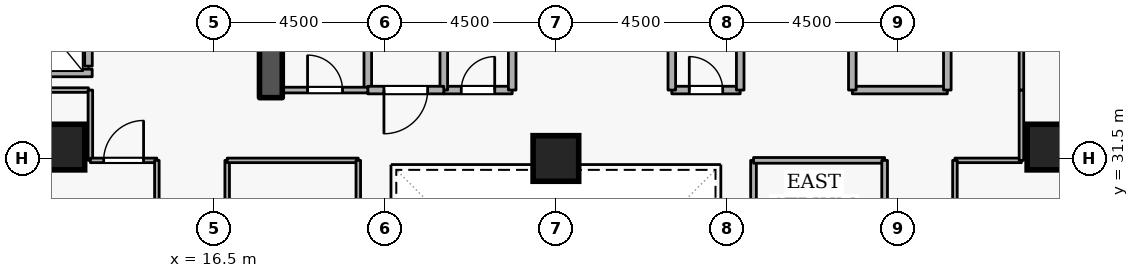
"""IFC4 building model, lengths in metres.
Left out: names, types, materials, properties, quantities, classifications, styles, units other than length and angle.
Written with IfcOpenShell. Run it as: python <this file> out.ifc"""

import sys

from ifc_helpers import new_model, si_unit, direction, frame, frame_2d, origin, origin_2d, place, context, subcontext, project, spatial, rectangle, extrude, element, fill, save


model = new_model("IFC4")
c1 = context("Model", 3, precision=1e-05, world=origin(), true_north=direction((0.0, 1.0)))
c2 = subcontext(c1, "Body", "Model", "MODEL_VIEW")
j1 = project(units=[si_unit("LENGTHUNIT", "METRE"), si_unit("PLANEANGLEUNIT", "RADIAN")], contexts=[c1])
p1 = place(None, origin())
s1 = spatial("IfcSite", under=j1, at=p1, CompositionType="ELEMENT")
p2 = place(p1, origin())
s2 = spatial("IfcBuilding", under=s1, at=p2, CompositionType="ELEMENT")
p3 = place(p2, frame((0.0, 0.0, 112.5)))
s3 = spatial("IfcBuildingStorey", under=s2, at=p3, CompositionType="ELEMENT", Elevation=112.5)
p4 = place(p3, frame((18.0, 33.1, 0.0), z_axis=(0.0, 0.0, 1.0), x_axis=(0.0, 1.0, 0.0)))
e1 = element("IfcWall", 1, at=p4, inside=s3, PredefinedType="SHEAR", context=c2, shape_type="SweptSolid", body=[
    extrude(rectangle(XDim=5.7, YDim=0.6, at=frame_2d((2.85, 0.0))), origin(), (0.0, 0.0, 1.0), 3.6),
])
for number, where, z_axis, x_axis in (
    (2, (12.5, 31.8, 0.0), (0.0, 0.0, 1.0), (1.0, 0.0, 0.0)),
    (3, (38.5, 31.8, 0.0), (0.0, 0.0, 1.0), (1.0, 0.0, 0.0)),
    (4, (25.5, 31.5, 0.0), (0.0, 0.0, 1.0), (1.0, 0.0, 0.0)),
):
    element("IfcColumn", number, at=place(p3, frame(where, z_axis=z_axis, x_axis=x_axis)), inside=s3, PredefinedType="COLUMN", context=c2, shape_type="SweptSolid", body=[
        extrude(rectangle(XDim=1.2, YDim=1.2, at=origin_2d()), origin(), (0.0, 0.0, 1.0), 3.6),
    ])
p5 = place(p3, frame((13.2, 33.93, 0.0), z_axis=(0.0, 0.0, 1.0), x_axis=(0.0, 1.0, 0.0)))
e5 = element("IfcWall", 5, at=p5, inside=s3, PredefinedType="STANDARD", context=c2, shape_type="SweptSolid", body=[
    extrude(rectangle(XDim=1.94, YDim=0.2, at=frame_2d((0.97, 0.0))), origin(), (0.0, 0.0, 1.0), 3.34),
])
p6 = place(p5, frame((0.46, 0.0, 0.0)))
e6 = element("IfcOpeningElement", 6, at=p6, cuts=e5, PredefinedType="OPENING", context=c2, shape_type="SweptSolid", body=[
    extrude(rectangle(XDim=1.02, YDim=2.06, at=frame_2d((0.51, 1.03))), frame((0.0, 0.11, 0.0), z_axis=(0.0, -1.0, 0.0), x_axis=(1.0, 0.0, 0.0)), (0.0, 0.0, 1.0), 0.22),
])
p7 = place(p3, frame((11.002, 33.75, 0.0), z_axis=(0.0, 0.0, 1.0), x_axis=(1.0, 0.0, 0.0)))
e7 = element("IfcWall", 7, at=p7, inside=s3, PredefinedType="STANDARD", context=c2, shape_type="SweptSolid", body=[
    extrude(rectangle(XDim=2.296, YDim=0.2, at=frame_2d((1.148, 0.0))), origin(), (0.0, 0.0, 1.0), 3.34),
])
p8 = place(p3, frame((33.3, 33.3, 0.0), z_axis=(0.0, 0.0, 1.0), x_axis=(1.0, 0.0, 0.0)))
e8 = element("IfcWall", 8, at=p8, inside=s3, PredefinedType="STANDARD", context=c2, shape_type="SweptSolid", body=[
    extrude(rectangle(XDim=2.5, YDim=0.2, at=frame_2d((1.25, 0.0))), origin(), (0.0, 0.0, 1.0), 3.34),
])
p9 = place(p3, frame((35.8, 33.3, 0.0), z_axis=(0.0, 0.0, 1.0), x_axis=(0.0, 1.0, 0.0)))
e9 = element("IfcWall", 9, at=p9, inside=s3, PredefinedType="STANDARD", context=c2, shape_type="SweptSolid", body=[
    extrude(rectangle(XDim=5.7, YDim=0.2, at=frame_2d((2.85, 0.0))), origin(), (0.0, 0.0, 1.0), 3.34),
])
p10 = place(p9, frame((2.275, 0.0, 0.0)))
e10 = element("IfcOpeningElement", 10, at=p10, cuts=e9, PredefinedType="OPENING", context=c2, shape_type="SweptSolid", body=[
    extrude(rectangle(XDim=1.15, YDim=2.1, at=frame_2d((0.575, 1.05))), frame((0.0, 0.11, 0.0), z_axis=(0.0, -1.0, 0.0), x_axis=(1.0, 0.0, 0.0)), (0.0, 0.0, 1.0), 0.22),
])
p11 = place(p3, frame((33.3, 35.6, 0.0), z_axis=(0.0, 0.0, 1.0), x_axis=(0.0, -1.0, 0.0)))
e11 = element("IfcWall", 11, at=p11, inside=s3, PredefinedType="STANDARD", context=c2, shape_type="SweptSolid", body=[
    extrude(rectangle(XDim=2.3, YDim=0.2, at=frame_2d((1.15, 0.0))), origin(), (0.0, 0.0, 1.0), 2.545),
])
p12 = place(p3, frame((22.55, 33.3, 0.0), z_axis=(0.0, 0.0, 1.0), x_axis=(1.0, 0.0, 0.0)))
e12 = element("IfcWall", 12, at=p12, inside=s3, PredefinedType="STANDARD", context=c2, shape_type="SweptSolid", body=[
    extrude(rectangle(XDim=1.8, YDim=0.2, at=frame_2d((0.9, 0.0))), origin(), (0.0, 0.0, 1.0), 3.34),
])
p13 = place(p12, frame((0.46, 0.0, 0.0)))
e13 = element("IfcOpeningElement", 13, at=p13, cuts=e12, PredefinedType="OPENING", context=c2, shape_type="SweptSolid", body=[
    extrude(rectangle(XDim=0.88, YDim=2.04, at=frame_2d((0.44, 1.02))), frame((0.0, 0.11, 0.0), z_axis=(0.0, -1.0, 0.0), x_axis=(1.0, 0.0, 0.0)), (0.0, 0.0, 1.0), 0.22),
])
for number, where, z_axis, x_axis in (
    (14, (24.35, 33.3, 0.0), (0.0, 0.0, 1.0), (0.0, 1.0, 0.0)),
    (15, (22.55, 35.35, 0.0), (0.0, 0.0, 1.0), (0.0, -1.0, 0.0)),
):
    element("IfcWall", number, at=place(p3, frame(where, z_axis=z_axis, x_axis=x_axis)), inside=s3, PredefinedType="STANDARD", context=c2, shape_type="SweptSolid", body=[
        extrude(rectangle(XDim=2.05, YDim=0.2, at=frame_2d((1.025, 0.0))), origin(), (0.0, 0.0, 1.0), 3.34),
    ])
p14 = place(p3, frame((28.55, 33.3, 0.0), z_axis=(0.0, 0.0, 1.0), x_axis=(1.0, 0.0, 0.0)))
e16 = element("IfcWall", 16, at=p14, inside=s3, PredefinedType="STANDARD", context=c2, shape_type="SweptSolid", body=[
    extrude(rectangle(XDim=1.8, YDim=0.2, at=frame_2d((0.9, 0.0))), origin(), (0.0, 0.0, 1.0), 3.34),
])
p15 = place(p14, frame((0.46, 0.0, 0.0)))
e17 = element("IfcOpeningElement", 17, at=p15, cuts=e16, PredefinedType="OPENING", context=c2, shape_type="SweptSolid", body=[
    extrude(rectangle(XDim=0.88, YDim=2.04, at=frame_2d((0.44, 1.02))), frame((0.0, 0.11, 0.0), z_axis=(0.0, -1.0, 0.0), x_axis=(1.0, 0.0, 0.0)), (0.0, 0.0, 1.0), 0.22),
])
for number, where, z_axis, x_axis in (
    (18, (30.35, 33.3, 0.0), (0.0, 0.0, 1.0), (0.0, 1.0, 0.0)),
    (19, (28.55, 35.35, 0.0), (0.0, 0.0, 1.0), (0.0, -1.0, 0.0)),
    (20, (20.55, 33.3, 0.0), (0.0, 0.0, 1.0), (0.0, 1.0, 0.0)),
):
    element("IfcWall", number, at=place(p3, frame(where, z_axis=z_axis, x_axis=x_axis)), inside=s3, PredefinedType="STANDARD", context=c2, shape_type="SweptSolid", body=[
        extrude(rectangle(XDim=2.05, YDim=0.2, at=frame_2d((1.025, 0.0))), origin(), (0.0, 0.0, 1.0), 3.34),
    ])
p16 = place(p3, frame((22.55, 33.3, 0.0), z_axis=(0.0, 0.0, 1.0), x_axis=(-1.0, 0.0, 0.0)))
e21 = element("IfcWall", 21, at=p16, inside=s3, PredefinedType="STANDARD", context=c2, shape_type="SweptSolid", body=[
    extrude(rectangle(XDim=2.0, YDim=0.2, at=frame_2d((1.0, 0.0))), origin(), (0.0, 0.0, 1.0), 3.34),
])
p17 = place(p16, frame((0.425, 0.0, 0.0)))
e22 = element("IfcOpeningElement", 22, at=p17, cuts=e21, PredefinedType="OPENING", context=c2, shape_type="SweptSolid", body=[
    extrude(rectangle(XDim=1.15, YDim=2.1, at=frame_2d((0.575, 1.05))), frame((0.0, 0.11, 0.0), z_axis=(0.0, -1.0, 0.0), x_axis=(1.0, 0.0, 0.0)), (0.0, 0.0, 1.0), 0.22),
])
p18 = place(p3, frame((18.3, 33.3, 0.0), z_axis=(0.0, 0.0, 1.0), x_axis=(1.0, 0.0, 0.0)))
e23 = element("IfcWall", 23, at=p18, inside=s3, PredefinedType="PARTITIONING", context=c2, shape_type="SweptSolid", body=[
    extrude(rectangle(XDim=2.25, YDim=0.15, at=frame_2d((1.125, 0.0))), origin(), (0.0, 0.0, 1.0), 3.34),
])
p19 = place(p18, frame((0.665, 0.0, 0.0)))
e24 = element("IfcOpeningElement", 24, at=p19, cuts=e23, PredefinedType="OPENING", context=c2, shape_type="SweptSolid", body=[
    extrude(rectangle(XDim=0.92, YDim=2.08, at=frame_2d((0.46, 1.04))), frame((0.0, 0.085, 0.0), z_axis=(0.0, -1.0, 0.0), x_axis=(1.0, 0.0, 0.0)), (0.0, 0.0, 1.0), 0.17),
])
p20 = place(p3, frame((10.9, 33.3, 0.0), z_axis=(0.0, 0.0, 1.0), x_axis=(1.0, 0.0, 0.0)))
e25 = element("IfcWall", 25, at=p20, inside=s3, PredefinedType="PARTITIONING", context=c2, shape_type="SweptSolid", body=[
    extrude(rectangle(XDim=2.3, YDim=0.12, at=frame_2d((1.15, 0.0))), origin(), (0.0, 0.0, 1.0), 3.34),
])
p21 = place(p3, frame((13.25, 33.3, 0.0), z_axis=(0.0, 0.0, 1.0), x_axis=(0.0, -1.0, 0.0)))
e26 = element("IfcWall", 26, at=p21, inside=s3, PredefinedType="PARTITIONING", context=c2, shape_type="SweptSolid", body=[
    extrude(rectangle(XDim=1.85, YDim=0.12, at=frame_2d((0.925, 0.0))), origin(), (0.0, 0.0, 1.0), 3.34),
])
p22 = place(p3, frame((13.25, 31.45, 0.0), z_axis=(0.0, 0.0, 1.0), x_axis=(1.0, 0.0, 0.0)))
e27 = element("IfcWall", 27, at=p22, inside=s3, PredefinedType="PARTITIONING", context=c2, shape_type="SweptSolid", body=[
    extrude(rectangle(XDim=1.75, YDim=0.12, at=frame_2d((0.875, 0.0))), origin(), (0.0, 0.0, 1.0), 3.34),
])
p23 = place(p22, frame((0.35, 0.0, 0.0)))
e28 = element("IfcOpeningElement", 28, at=p23, cuts=e27, PredefinedType="OPENING", context=c2, shape_type="SweptSolid", body=[
    extrude(rectangle(XDim=1.05, YDim=2.1, at=frame_2d((0.525, 1.05))), frame((0.0, 0.07, 0.0), z_axis=(0.0, -1.0, 0.0), x_axis=(1.0, 0.0, 0.0)), (0.0, 0.0, 1.0), 0.14),
])
p24 = place(p3, frame((15.0, 31.45, 0.0), z_axis=(0.0, 0.0, 1.0), x_axis=(0.0, -1.0, 0.0)))
e29 = element("IfcWall", 29, at=p24, inside=s3, PredefinedType="PARTITIONING", context=c2, shape_type="SweptSolid", body=[
    extrude(rectangle(XDim=1.3, YDim=0.12, at=frame_2d((0.65, 0.0))), origin(), (0.0, 0.0, 1.0), 3.34),
])
p25 = place(p3, frame((36.0, 31.45, 0.0), z_axis=(0.0, 0.0, 1.0), x_axis=(1.0, 0.0, 0.0)))
e30 = element("IfcWall", 30, at=p25, inside=s3, PredefinedType="PARTITIONING", context=c2, shape_type="SweptSolid", body=[
    extrude(rectangle(XDim=1.75, YDim=0.12, at=frame_2d((0.875, 0.0))), origin(), (0.0, 0.0, 1.0), 3.34),
])
p26 = place(p3, frame((37.75, 31.45, 0.0), z_axis=(0.0, 0.0, 1.0), x_axis=(0.0, 1.0, 0.0)))
e31 = element("IfcWall", 31, at=p26, inside=s3, PredefinedType="PARTITIONING", context=c2, shape_type="SweptSolid", body=[
    extrude(rectangle(XDim=1.85, YDim=0.12, at=frame_2d((0.925, 0.0))), origin(), (0.0, 0.0, 1.0), 3.34),
])
p27 = place(p3, frame((37.75, 33.3, 0.0), z_axis=(0.0, 0.0, 1.0), x_axis=(0.0, 1.0, 0.0)))
e32 = element("IfcWall", 32, at=p27, inside=s3, PredefinedType="PARTITIONING", context=c2, shape_type="SweptSolid", body=[
    extrude(rectangle(XDim=9.35, YDim=0.12, at=frame_2d((4.675, 0.0))), origin(), (0.0, 0.0, 1.0), 3.34),
])
p28 = place(p27, frame((4.2, 0.0, 0.0)))
e33 = element("IfcOpeningElement", 33, at=p28, cuts=e32, PredefinedType="OPENING", context=c2, shape_type="SweptSolid", body=[
    extrude(rectangle(XDim=0.95, YDim=2.1, at=frame_2d((0.475, 1.05))), frame((0.0, 0.07, 0.0), z_axis=(0.0, -1.0, 0.0), x_axis=(1.0, 0.0, 0.0)), (0.0, 0.0, 1.0), 0.14),
])
p29 = place(p3, frame((36.0, 30.15, 0.0), z_axis=(0.0, 0.0, 1.0), x_axis=(0.0, 1.0, 0.0)))
e34 = element("IfcWall", 34, at=p29, inside=s3, PredefinedType="PARTITIONING", context=c2, shape_type="SweptSolid", body=[
    extrude(rectangle(XDim=1.3, YDim=0.12, at=frame_2d((0.65, 0.0))), origin(), (0.0, 0.0, 1.0), 3.34),
])
p30 = place(p3, frame((30.7, 22.55, 0.0), z_axis=(0.0, 0.0, 1.0), x_axis=(0.0, 1.0, 0.0)))
e35 = element("IfcWall", 35, at=p30, inside=s3, PredefinedType="PARTITIONING", context=c2, shape_type="SweptSolid", body=[
    extrude(rectangle(XDim=8.9, YDim=0.15, at=frame_2d((4.45, 0.0))), origin(), (0.0, 0.0, 1.0), 3.34),
])
p31 = place(p3, frame((30.7, 31.45, 0.0), z_axis=(0.0, 0.0, 1.0), x_axis=(1.0, 0.0, 0.0)))
e36 = element("IfcWall", 36, at=p31, inside=s3, PredefinedType="PARTITIONING", context=c2, shape_type="SweptSolid", body=[
    extrude(rectangle(XDim=3.45, YDim=0.15, at=frame_2d((1.725, 0.0))), origin(), (0.0, 0.0, 1.0), 3.34),
])
p32 = place(p3, frame((34.15, 31.45, 0.0), z_axis=(0.0, 0.0, 1.0), x_axis=(0.0, -1.0, 0.0)))
e37 = element("IfcWall", 37, at=p32, inside=s3, PredefinedType="PARTITIONING", context=c2, shape_type="SweptSolid", body=[
    extrude(rectangle(XDim=8.9, YDim=0.15, at=frame_2d((4.45, 0.0))), origin(), (0.0, 0.0, 1.0), 3.34),
])
p33 = place(p32, frame((3.8, 0.0, 0.0)))
e38 = element("IfcOpeningElement", 38, at=p33, cuts=e37, PredefinedType="OPENING", context=c2, shape_type="SweptSolid", body=[
    extrude(rectangle(XDim=1.3, YDim=2.12, at=frame_2d((0.65, 1.06))), frame((0.0, 0.085, 0.0), z_axis=(0.0, -1.0, 0.0), x_axis=(1.0, 0.0, 0.0)), (0.0, 0.0, 1.0), 0.17),
])
p34 = place(p3, frame((16.85, 22.55, 0.0), z_axis=(0.0, 0.0, 1.0), x_axis=(0.0, 1.0, 0.0)))
e39 = element("IfcWall", 39, at=p34, inside=s3, PredefinedType="PARTITIONING", context=c2, shape_type="SweptSolid", body=[
    extrude(rectangle(XDim=8.9, YDim=0.12, at=frame_2d((4.45, 0.0))), origin(), (0.0, 0.0, 1.0), 3.34),
])
p35 = place(p34, frame((3.975, 0.0, 0.0)))
e40 = element("IfcOpeningElement", 40, at=p35, cuts=e39, PredefinedType="OPENING", context=c2, shape_type="SweptSolid", body=[
    extrude(rectangle(XDim=0.95, YDim=2.1, at=frame_2d((0.475, 1.05))), frame((0.0, 0.07, 0.0), z_axis=(0.0, -1.0, 0.0), x_axis=(1.0, 0.0, 0.0)), (0.0, 0.0, 1.0), 0.14),
])
p36 = place(p3, frame((16.85, 31.45, 0.0), z_axis=(0.0, 0.0, 1.0), x_axis=(1.0, 0.0, 0.0)))
e41 = element("IfcWall", 41, at=p36, inside=s3, PredefinedType="PARTITIONING", context=c2, shape_type="SweptSolid", body=[
    extrude(rectangle(XDim=3.45, YDim=0.12, at=frame_2d((1.725, 0.0))), origin(), (0.0, 0.0, 1.0), 3.34),
])
p37 = place(p3, frame((20.3, 31.45, 0.0), z_axis=(0.0, 0.0, 1.0), x_axis=(0.0, -1.0, 0.0)))
e42 = element("IfcWall", 42, at=p37, inside=s3, PredefinedType="PARTITIONING", context=c2, shape_type="SweptSolid", body=[
    extrude(rectangle(XDim=8.9, YDim=0.12, at=frame_2d((4.45, 0.0))), origin(), (0.0, 0.0, 1.0), 3.34),
])
p38 = place(p13, origin())
e43 = element("IfcDoor", 43, at=p38, inside=s3, OperationType="SINGLE_SWING_RIGHT", PredefinedType="DOOR", context=c2, shape_type="SweptSolid", body=[
    extrude(rectangle(XDim=0.88, YDim=2.04, at=frame_2d((0.44, 1.02))), frame((0.0, 0.025, 0.0), z_axis=(0.0, -1.0, 0.0), x_axis=(1.0, 0.0, 0.0)), (0.0, 0.0, 1.0), 0.05),
])
fill(e13, e43)
p39 = place(p15, origin())
e44 = element("IfcDoor", 44, at=p39, inside=s3, OperationType="SINGLE_SWING_LEFT", PredefinedType="DOOR", context=c2, shape_type="SweptSolid", body=[
    extrude(rectangle(XDim=0.88, YDim=2.04, at=frame_2d((0.44, 1.02))), frame((0.0, 0.025, 0.0), z_axis=(0.0, -1.0, 0.0), x_axis=(1.0, 0.0, 0.0)), (0.0, 0.0, 1.0), 0.05),
])
fill(e17, e44)
p40 = place(p19, origin())
e45 = element("IfcDoor", 45, at=p40, inside=s3, OperationType="SINGLE_SWING_LEFT", PredefinedType="DOOR", context=c2, shape_type="SweptSolid", body=[
    extrude(rectangle(XDim=0.92, YDim=2.08, at=frame_2d((0.46, 1.04))), frame((0.0, 0.025, 0.0), z_axis=(0.0, -1.0, 0.0), x_axis=(1.0, 0.0, 0.0)), (0.0, 0.0, 1.0), 0.05),
])
fill(e24, e45)
p41 = place(p17, origin())
e46 = element("IfcDoor", 46, at=p41, inside=s3, OperationType="SINGLE_SWING_RIGHT", PredefinedType="DOOR", context=c2, shape_type="SweptSolid", body=[
    extrude(rectangle(XDim=1.15, YDim=2.1, at=frame_2d((0.575, 1.05))), frame((0.0, 0.025, 0.0), z_axis=(0.0, -1.0, 0.0), x_axis=(1.0, 0.0, 0.0)), (0.0, 0.0, 1.0), 0.05),
])
fill(e22, e46)
p42 = place(p23, origin())
e47 = element("IfcDoor", 47, at=p42, inside=s3, OperationType="SINGLE_SWING_RIGHT", PredefinedType="DOOR", context=c2, shape_type="SweptSolid", body=[
    extrude(rectangle(XDim=1.05, YDim=2.1, at=frame_2d((0.525, 1.05))), frame((0.0, 0.025, 0.0), z_axis=(0.0, -1.0, 0.0), x_axis=(1.0, 0.0, 0.0)), (0.0, 0.0, 1.0), 0.05),
])
fill(e28, e47)
save(model, sys.argv[1])
